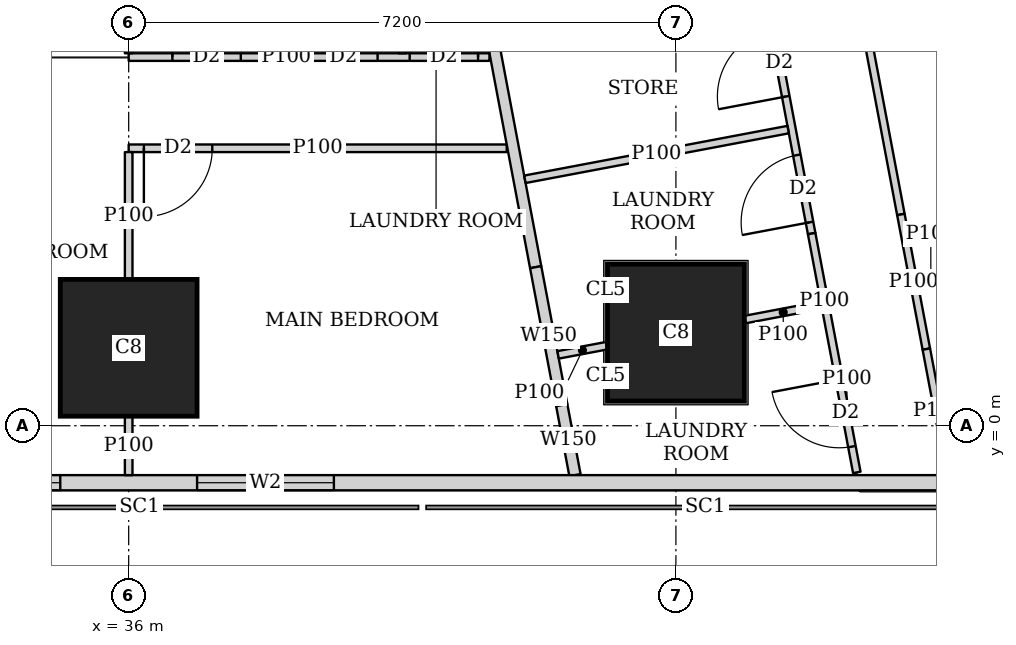
"""IFC4 building model, lengths in metres.
Left out: names, types, materials, properties, quantities, classifications, styles, units other than length and angle.
Written with IfcOpenShell. Run it as: python <this file> out.ifc"""

import sys

from ifc_helpers import new_model, si_unit, direction, frame, frame_2d, origin, origin_2d, place, context, subcontext, project, spatial, rectangle, extrude, element, fill, save


model = new_model("IFC4")
c1 = context("Model", 3, precision=1e-05, world=origin(), true_north=direction((0.0, 1.0)))
c2 = subcontext(c1, "Body", "Model", "MODEL_VIEW")
j1 = project(units=[si_unit("LENGTHUNIT", "METRE"), si_unit("PLANEANGLEUNIT", "RADIAN")], contexts=[c1])
p1 = place(None, origin())
s1 = spatial("IfcSite", under=j1, at=p1, CompositionType="ELEMENT")
p2 = place(p1, origin())
s2 = spatial("IfcBuilding", under=s1, at=p2, CompositionType="ELEMENT")
p3 = place(p2, frame((0.0, 0.0, 139.55)))
s3 = spatial("IfcBuildingStorey", under=s2, at=p3, CompositionType="ELEMENT", Elevation=139.55)
for number, where, z_axis, x_axis in (
    (1, (36.0, 1.025, 0.0), (0.0, 0.0, 1.0), (1.0, 0.0, 0.0)),
    (2, (43.2, 1.225, 0.0), (0.0, 0.0, 1.0), (1.0, 0.0, 0.0)),
):
    element("IfcColumn", number, at=place(p3, frame(where, z_axis=z_axis, x_axis=x_axis)), inside=s3, PredefinedType="COLUMN", context=c2, shape_type="SweptSolid", body=[
        extrude(rectangle(XDim=1.8, YDim=1.8, at=origin_2d()), origin(), (0.0, 0.0, 1.0), 3.75),
    ])
p4 = place(p3, frame((2.163, -0.75, 0.0), z_axis=(0.0, 0.0, 1.0), x_axis=(1.0, 0.0, 0.0)))
e3 = element("IfcWall", 3, at=p4, inside=s3, PredefinedType="SOLIDWALL", context=c2, shape_type="SweptSolid", body=[
    extrude(rectangle(XDim=45.628, YDim=0.2, at=frame_2d((22.814, 0.0))), origin(), (0.0, 0.0, 1.0), 3.5),
])
p5 = place(p4, frame((9.537, 0.0, 0.9)))
e4 = element("IfcOpeningElement", 4, at=p5, cuts=e3, PredefinedType="OPENING", context=c2, shape_type="SweptSolid", body=[
    extrude(rectangle(XDim=1.8, YDim=1.5, at=frame_2d((0.9, 0.75))), frame((0.0, 0.11, 0.0), z_axis=(0.0, -1.0, 0.0), x_axis=(1.0, 0.0, 0.0)), (0.0, 0.0, 1.0), 0.22),
])
p6 = place(p4, frame((13.137, 0.0, 0.9)))
e5 = element("IfcOpeningElement", 5, at=p6, cuts=e3, PredefinedType="OPENING", context=c2, shape_type="SweptSolid", body=[
    extrude(rectangle(XDim=1.8, YDim=1.5, at=frame_2d((0.9, 0.75))), frame((0.0, 0.11, 0.0), z_axis=(0.0, -1.0, 0.0), x_axis=(1.0, 0.0, 0.0)), (0.0, 0.0, 1.0), 0.22),
])
p7 = place(p4, frame((16.737, 0.0, 0.9)))
e6 = element("IfcOpeningElement", 6, at=p7, cuts=e3, PredefinedType="OPENING", context=c2, shape_type="SweptSolid", body=[
    extrude(rectangle(XDim=1.8, YDim=1.5, at=frame_2d((0.9, 0.75))), frame((0.0, 0.11, 0.0), z_axis=(0.0, -1.0, 0.0), x_axis=(1.0, 0.0, 0.0)), (0.0, 0.0, 1.0), 0.22),
])
p8 = place(p4, frame((20.337, 0.0, 0.9)))
e7 = element("IfcOpeningElement", 7, at=p8, cuts=e3, PredefinedType="OPENING", context=c2, shape_type="SweptSolid", body=[
    extrude(rectangle(XDim=1.8, YDim=1.5, at=frame_2d((0.9, 0.75))), frame((0.0, 0.11, 0.0), z_axis=(0.0, -1.0, 0.0), x_axis=(1.0, 0.0, 0.0)), (0.0, 0.0, 1.0), 0.22),
])
p9 = place(p4, frame((23.937, 0.0, 0.9)))
e8 = element("IfcOpeningElement", 8, at=p9, cuts=e3, PredefinedType="OPENING", context=c2, shape_type="SweptSolid", body=[
    extrude(rectangle(XDim=1.8, YDim=1.5, at=frame_2d((0.9, 0.75))), frame((0.0, 0.11, 0.0), z_axis=(0.0, -1.0, 0.0), x_axis=(1.0, 0.0, 0.0)), (0.0, 0.0, 1.0), 0.22),
])
p10 = place(p4, frame((27.537, 0.0, 0.9)))
e9 = element("IfcOpeningElement", 9, at=p10, cuts=e3, PredefinedType="OPENING", context=c2, shape_type="SweptSolid", body=[
    extrude(rectangle(XDim=1.8, YDim=1.5, at=frame_2d((0.9, 0.75))), frame((0.0, 0.11, 0.0), z_axis=(0.0, -1.0, 0.0), x_axis=(1.0, 0.0, 0.0)), (0.0, 0.0, 1.0), 0.22),
])
p11 = place(p4, frame((31.137, 0.0, 0.9)))
e10 = element("IfcOpeningElement", 10, at=p11, cuts=e3, PredefinedType="OPENING", context=c2, shape_type="SweptSolid", body=[
    extrude(rectangle(XDim=1.8, YDim=1.5, at=frame_2d((0.9, 0.75))), frame((0.0, 0.11, 0.0), z_axis=(0.0, -1.0, 0.0), x_axis=(1.0, 0.0, 0.0)), (0.0, 0.0, 1.0), 0.22),
])
p12 = place(p4, frame((34.737, 0.0, 0.9)))
e11 = element("IfcOpeningElement", 11, at=p12, cuts=e3, PredefinedType="OPENING", context=c2, shape_type="SweptSolid", body=[
    extrude(rectangle(XDim=1.8, YDim=1.5, at=frame_2d((0.9, 0.75))), frame((0.0, 0.11, 0.0), z_axis=(0.0, -1.0, 0.0), x_axis=(1.0, 0.0, 0.0)), (0.0, 0.0, 1.0), 0.22),
])
p13 = place(p3, frame((50.653, 2.703, 0.0), z_axis=(0.0, 0.0, 1.0), x_axis=(-0.185612026696, 0.982623109613, 0.0)))
e12 = element("IfcWall", 12, at=p13, inside=s3, PredefinedType="SOLIDWALL", context=c2, shape_type="SweptSolid", body=[
    extrude(rectangle(XDim=41.393, YDim=0.2, at=frame_2d((20.697, 0.0))), origin(), (0.0, 0.0, 1.0), 3.5),
])
p14 = place(p13, frame((1.633, 0.0, 0.9)))
e13 = element("IfcOpeningElement", 13, at=p14, cuts=e12, PredefinedType="OPENING", context=c2, shape_type="SweptSolid", body=[
    extrude(rectangle(XDim=1.8, YDim=1.5, at=frame_2d((0.9, 0.75))), frame((0.0, 0.11, 0.0), z_axis=(0.0, -1.0, 0.0), x_axis=(1.0, 0.0, 0.0)), (0.0, 0.0, 1.0), 0.22),
])
p15 = place(p13, frame((6.032, 0.0, 0.9)))
e14 = element("IfcOpeningElement", 14, at=p15, cuts=e12, PredefinedType="OPENING", context=c2, shape_type="SweptSolid", body=[
    extrude(rectangle(XDim=1.8, YDim=1.5, at=frame_2d((0.9, 0.75))), frame((0.0, 0.11, 0.0), z_axis=(0.0, -1.0, 0.0), x_axis=(1.0, 0.0, 0.0)), (0.0, 0.0, 1.0), 0.22),
])
p16 = place(p13, frame((9.848, 0.0, 0.9)))
e15 = element("IfcOpeningElement", 15, at=p16, cuts=e12, PredefinedType="OPENING", context=c2, shape_type="SweptSolid", body=[
    extrude(rectangle(XDim=1.8, YDim=1.5, at=frame_2d((0.9, 0.75))), frame((0.0, 0.11, 0.0), z_axis=(0.0, -1.0, 0.0), x_axis=(1.0, 0.0, 0.0)), (0.0, 0.0, 1.0), 0.22),
])
p17 = place(p13, frame((13.664, 0.0, 0.9)))
e16 = element("IfcOpeningElement", 16, at=p17, cuts=e12, PredefinedType="OPENING", context=c2, shape_type="SweptSolid", body=[
    extrude(rectangle(XDim=1.8, YDim=1.5, at=frame_2d((0.9, 0.75))), frame((0.0, 0.11, 0.0), z_axis=(0.0, -1.0, 0.0), x_axis=(1.0, 0.0, 0.0)), (0.0, 0.0, 1.0), 0.22),
])
p18 = place(p13, frame((17.481, 0.0, 0.9)))
e17 = element("IfcOpeningElement", 17, at=p18, cuts=e12, PredefinedType="OPENING", context=c2, shape_type="SweptSolid", body=[
    extrude(rectangle(XDim=1.8, YDim=1.5, at=frame_2d((0.9, 0.75))), frame((0.0, 0.11, 0.0), z_axis=(0.0, -1.0, 0.0), x_axis=(1.0, 0.0, 0.0)), (0.0, 0.0, 1.0), 0.22),
])
p19 = place(p13, frame((21.297, 0.0, 0.9)))
e18 = element("IfcOpeningElement", 18, at=p19, cuts=e12, PredefinedType="OPENING", context=c2, shape_type="SweptSolid", body=[
    extrude(rectangle(XDim=1.8, YDim=1.5, at=frame_2d((0.9, 0.75))), frame((0.0, 0.11, 0.0), z_axis=(0.0, -1.0, 0.0), x_axis=(1.0, 0.0, 0.0)), (0.0, 0.0, 1.0), 0.22),
])
p20 = place(p13, frame((25.113, 0.0, 0.9)))
e19 = element("IfcOpeningElement", 19, at=p20, cuts=e12, PredefinedType="OPENING", context=c2, shape_type="SweptSolid", body=[
    extrude(rectangle(XDim=1.8, YDim=1.5, at=frame_2d((0.9, 0.75))), frame((0.0, 0.11, 0.0), z_axis=(0.0, -1.0, 0.0), x_axis=(1.0, 0.0, 0.0)), (0.0, 0.0, 1.0), 0.22),
])
p21 = place(p13, frame((28.93, 0.0, 0.9)))
e20 = element("IfcOpeningElement", 20, at=p21, cuts=e12, PredefinedType="OPENING", context=c2, shape_type="SweptSolid", body=[
    extrude(rectangle(XDim=1.8, YDim=1.5, at=frame_2d((0.9, 0.75))), frame((0.0, 0.11, 0.0), z_axis=(0.0, -1.0, 0.0), x_axis=(1.0, 0.0, 0.0)), (0.0, 0.0, 1.0), 0.22),
])
p22 = place(p13, frame((32.746, 0.0, 0.9)))
e21 = element("IfcOpeningElement", 21, at=p22, cuts=e12, PredefinedType="OPENING", context=c2, shape_type="SweptSolid", body=[
    extrude(rectangle(XDim=1.8, YDim=1.5, at=frame_2d((0.9, 0.75))), frame((0.0, 0.11, 0.0), z_axis=(0.0, -1.0, 0.0), x_axis=(1.0, 0.0, 0.0)), (0.0, 0.0, 1.0), 0.22),
])
p23 = place(p13, frame((36.481, 0.0, 0.9)))
e22 = element("IfcOpeningElement", 22, at=p23, cuts=e12, PredefinedType="OPENING", context=c2, shape_type="SweptSolid", body=[
    extrude(rectangle(XDim=1.8, YDim=1.5, at=frame_2d((0.9, 0.75))), frame((0.0, 0.11, 0.0), z_axis=(0.0, -1.0, 0.0), x_axis=(1.0, 0.0, 0.0)), (0.0, 0.0, 1.0), 0.22),
])
p24 = place(p3, frame((33.623, 43.022, 0.0), z_axis=(0.0, 0.0, 1.0), x_axis=(0.185596841028, -0.98262597798, 0.0)))
e23 = element("IfcWall", 23, at=p24, inside=s3, PredefinedType="SOLIDWALL", context=c2, shape_type="SweptSolid", body=[
    extrude(rectangle(XDim=41.66, YDim=0.15, at=frame_2d((20.83, 0.0))), origin(), (0.0, 0.0, 1.0), 2.5),
])
p25 = place(p24, frame((20.242, 0.0, 0.0)))
e24 = element("IfcOpeningElement", 24, at=p25, cuts=e23, PredefinedType="OPENING", context=c2, shape_type="SweptSolid", body=[
    extrude(rectangle(XDim=1.0, YDim=2.1, at=frame_2d((0.5, 1.05))), frame((0.0, 0.085, 0.0), z_axis=(0.0, -1.0, 0.0), x_axis=(1.0, 0.0, 0.0)), (0.0, 0.0, 1.0), 0.17),
])
p26 = place(p24, frame((24.714, 0.0, 0.0)))
e25 = element("IfcOpeningElement", 25, at=p26, cuts=e23, PredefinedType="OPENING", context=c2, shape_type="SweptSolid", body=[
    extrude(rectangle(XDim=1.0, YDim=2.1, at=frame_2d((0.5, 1.05))), frame((0.0, 0.085, 0.0), z_axis=(0.0, -1.0, 0.0), x_axis=(1.0, 0.0, 0.0)), (0.0, 0.0, 1.0), 0.17),
])
p27 = place(p24, frame((31.206, 0.0, 0.0)))
e26 = element("IfcOpeningElement", 26, at=p27, cuts=e23, PredefinedType="OPENING", context=c2, shape_type="SweptSolid", body=[
    extrude(rectangle(XDim=1.0, YDim=2.1, at=frame_2d((0.5, 1.05))), frame((0.0, 0.085, 0.0), z_axis=(0.0, -1.0, 0.0), x_axis=(1.0, 0.0, 0.0)), (0.0, 0.0, 1.0), 0.17),
])
p28 = place(p3, frame((41.355, 2.086, 0.0), z_axis=(0.0, 0.0, 1.0), x_axis=(0.185708872674, -0.982604811005, 0.0)))
e27 = element("IfcWall", 27, at=p28, inside=s3, PredefinedType="SOLIDWALL", context=c2, shape_type="SweptSolid", body=[
    extrude(rectangle(XDim=1.847, YDim=0.15, at=frame_2d((0.924, 0.0))), origin(), (0.0, 0.0, 1.0), 2.1),
])
p29 = place(p3, frame((41.698, 0.271, 0.0), z_axis=(0.0, 0.0, 1.0), x_axis=(0.185735329995, -0.982599810295, 0.0)))
e28 = element("IfcWall", 28, at=p29, inside=s3, PredefinedType="SOLIDWALL", context=c2, shape_type="SweptSolid", body=[
    extrude(rectangle(XDim=0.937, YDim=0.15, at=frame_2d((0.469, 0.0))), origin(), (0.0, 0.0, 1.0), 3.5),
])
p30 = place(p3, frame((40.974, 3.65, 0.0), z_axis=(0.0, 0.0, 1.0), x_axis=(-1.0, 0.0, 0.0)))
e29 = element("IfcWall", 29, at=p30, inside=s3, PredefinedType="PARTITIONING", context=c2, shape_type="SweptSolid", body=[
    extrude(rectangle(XDim=4.974, YDim=0.1, at=frame_2d((2.487, 0.0))), origin(), (0.0, 0.0, 1.0), 3.5),
])
p31 = place(p30, frame((3.874, 0.0, 0.0)))
e30 = element("IfcOpeningElement", 30, at=p31, cuts=e29, PredefinedType="OPENING", context=c2, shape_type="SweptSolid", body=[
    extrude(rectangle(XDim=0.9, YDim=2.1, at=frame_2d((0.45, 1.05))), frame((0.0, 0.06, 0.0), z_axis=(0.0, -1.0, 0.0), x_axis=(1.0, 0.0, 0.0)), (0.0, 0.0, 1.0), 0.12),
])
p32 = place(p3, frame((40.747, 4.85, 0.0), z_axis=(0.0, 0.0, 1.0), x_axis=(-1.0, 0.0, 0.0)))
e31 = element("IfcWall", 31, at=p32, inside=s3, PredefinedType="PARTITIONING", context=c2, shape_type="SweptSolid", body=[
    extrude(rectangle(XDim=4.747, YDim=0.1, at=frame_2d((2.374, 0.0))), origin(), (0.0, 0.0, 1.0), 3.5),
])
p33 = place(p32, frame((3.272, 0.0, 0.0)))
e32 = element("IfcOpeningElement", 32, at=p33, cuts=e31, PredefinedType="OPENING", context=c2, shape_type="SweptSolid", body=[
    extrude(rectangle(XDim=0.9, YDim=2.1, at=frame_2d((0.45, 1.05))), frame((0.0, 0.06, 0.0), z_axis=(0.0, -1.0, 0.0), x_axis=(1.0, 0.0, 0.0)), (0.0, 0.0, 1.0), 0.12),
])
p34 = place(p32, frame((0.15, 0.0, 0.0)))
e33 = element("IfcOpeningElement", 33, at=p34, cuts=e31, PredefinedType="OPENING", context=c2, shape_type="SweptSolid", body=[
    extrude(rectangle(XDim=0.9, YDim=2.1, at=frame_2d((0.45, 1.05))), frame((0.0, 0.06, 0.0), z_axis=(0.0, -1.0, 0.0), x_axis=(1.0, 0.0, 0.0)), (0.0, 0.0, 1.0), 0.12),
])
p35 = place(p32, frame((1.472, 0.0, 0.0)))
e34 = element("IfcOpeningElement", 34, at=p35, cuts=e31, PredefinedType="OPENING", context=c2, shape_type="SweptSolid", body=[
    extrude(rectangle(XDim=0.9, YDim=2.1, at=frame_2d((0.45, 1.05))), frame((0.0, 0.06, 0.0), z_axis=(0.0, -1.0, 0.0), x_axis=(1.0, 0.0, 0.0)), (0.0, 0.0, 1.0), 0.12),
])
p36 = place(p3, frame((36.0, -0.65, 0.0), z_axis=(0.0, 0.0, 1.0), x_axis=(0.0, 1.0, 0.0)))
e35 = element("IfcWall", 35, at=p36, inside=s3, PredefinedType="PARTITIONING", context=c2, shape_type="SweptSolid", body=[
    extrude(rectangle(XDim=0.774, YDim=0.1, at=frame_2d((0.387, 0.0))), origin(), (0.0, 0.0, 1.0), 3.5),
])
p37 = place(p3, frame((36.0, 1.926, 0.0), z_axis=(0.0, 0.0, 1.0), x_axis=(0.0, 1.0, 0.0)))
e36 = element("IfcWall", 36, at=p37, inside=s3, PredefinedType="PARTITIONING", context=c2, shape_type="SweptSolid", body=[
    extrude(rectangle(XDim=1.674, YDim=0.1, at=frame_2d((0.837, 0.0))), origin(), (0.0, 0.0, 1.0), 3.5),
])
p38 = place(p3, frame((36.0, 4.9, 0.0), z_axis=(0.0, 0.0, 1.0), x_axis=(0.0, 1.0, 0.0)))
e37 = element("IfcWall", 37, at=p38, inside=s3, PredefinedType="PARTITIONING", context=c2, shape_type="SweptSolid", body=[
    extrude(rectangle(XDim=1.849, YDim=0.1, at=frame_2d((0.925, 0.0))), origin(), (0.0, 0.0, 1.0), 3.5),
])
for number, where, z_axis, x_axis in (
    (38, (39.6, 4.9, 0.0), (0.0, 0.0, 1.0), (0.0, 1.0, 0.0)),
    (39, (38.05, 4.9, 0.0), (0.0, 0.0, 1.0), (0.0, 1.0, 0.0)),
):
    element("IfcWall", number, at=place(p3, frame(where, z_axis=z_axis, x_axis=x_axis)), inside=s3, PredefinedType="PARTITIONING", context=c2, shape_type="SweptSolid", body=[
        extrude(rectangle(XDim=3.525, YDim=0.1, at=frame_2d((1.763, 0.0))), origin(), (0.0, 0.0, 1.0), 3.5),
    ])
p39 = place(p3, frame((44.727, 10.366, 0.0), z_axis=(0.0, 0.0, 1.0), x_axis=(0.185578957652, -0.982629355595, 0.0)))
e40 = element("IfcWall", 40, at=p39, inside=s3, PredefinedType="PARTITIONING", context=c2, shape_type="SweptSolid", body=[
    extrude(rectangle(XDim=7.721, YDim=0.1, at=frame_2d((3.86, 0.0))), origin(), (0.0, 0.0, 1.0), 3.5),
])
p40 = place(p39, frame((0.151, 0.0, 0.0)))
e41 = element("IfcOpeningElement", 41, at=p40, cuts=e40, PredefinedType="OPENING", context=c2, shape_type="SweptSolid", body=[
    extrude(rectangle(XDim=0.9, YDim=2.1, at=frame_2d((0.45, 1.05))), frame((0.0, 0.06, 0.0), z_axis=(0.0, -1.0, 0.0), x_axis=(1.0, 0.0, 0.0)), (0.0, 0.0, 1.0), 0.12),
])
p41 = place(p39, frame((3.806, 0.0, 0.0)))
e42 = element("IfcOpeningElement", 42, at=p41, cuts=e40, PredefinedType="OPENING", context=c2, shape_type="SweptSolid", body=[
    extrude(rectangle(XDim=0.9, YDim=2.1, at=frame_2d((0.45, 1.05))), frame((0.0, 0.06, 0.0), z_axis=(0.0, -1.0, 0.0), x_axis=(1.0, 0.0, 0.0)), (0.0, 0.0, 1.0), 0.12),
])
p42 = place(p3, frame((46.16, 2.779, 0.0), z_axis=(0.0, 0.0, 1.0), x_axis=(0.18597295662, -0.982554863306, 0.0)))
e43 = element("IfcWall", 43, at=p42, inside=s3, PredefinedType="PARTITIONING", context=c2, shape_type="SweptSolid", body=[
    extrude(rectangle(XDim=1.802, YDim=0.1, at=frame_2d((0.901, 0.0))), origin(), (0.0, 0.0, 1.0), 2.1),
])
p43 = place(p3, frame((46.495, 1.008, 0.0), z_axis=(0.0, 0.0, 1.0), x_axis=(0.185535059532, -0.982637645159, 0.0)))
e44 = element("IfcWall", 44, at=p43, inside=s3, PredefinedType="PARTITIONING", context=c2, shape_type="SweptSolid", body=[
    extrude(rectangle(XDim=1.644, YDim=0.1, at=frame_2d((0.822, 0.0))), origin(), (0.0, 0.0, 1.0), 3.5),
])
p44 = place(p3, frame((43.999, 7.755, 0.0), z_axis=(0.0, 0.0, 1.0), x_axis=(0.185565904578, -0.982631820703, 0.0)))
e45 = element("IfcWall", 45, at=p44, inside=s3, PredefinedType="PARTITIONING", context=c2, shape_type="SweptSolid", body=[
    extrude(rectangle(XDim=5.319, YDim=0.1, at=frame_2d((2.66, 0.0))), origin(), (0.0, 0.0, 1.0), 3.5),
])
p45 = place(p44, frame((1.0, 0.0, 0.0)))
e46 = element("IfcOpeningElement", 46, at=p45, cuts=e45, PredefinedType="OPENING", context=c2, shape_type="SweptSolid", body=[
    extrude(rectangle(XDim=0.9, YDim=2.1, at=frame_2d((0.45, 1.05))), frame((0.0, 0.06, 0.0), z_axis=(0.0, -1.0, 0.0), x_axis=(1.0, 0.0, 0.0)), (0.0, 0.0, 1.0), 0.12),
])
p46 = place(p44, frame((4.269, 0.0, 0.0)))
e47 = element("IfcOpeningElement", 47, at=p46, cuts=e45, PredefinedType="OPENING", context=c2, shape_type="SweptSolid", body=[
    extrude(rectangle(XDim=0.9, YDim=2.1, at=frame_2d((0.45, 1.05))), frame((0.0, 0.06, 0.0), z_axis=(0.0, -1.0, 0.0), x_axis=(1.0, 0.0, 0.0)), (0.0, 0.0, 1.0), 0.12),
])
p47 = place(p44, frame((2.585, 0.0, 0.0)))
e48 = element("IfcOpeningElement", 48, at=p47, cuts=e45, PredefinedType="OPENING", context=c2, shape_type="SweptSolid", body=[
    extrude(rectangle(XDim=0.9, YDim=2.1, at=frame_2d((0.45, 1.05))), frame((0.0, 0.06, 0.0), z_axis=(0.0, -1.0, 0.0), x_axis=(1.0, 0.0, 0.0)), (0.0, 0.0, 1.0), 0.12),
])
p48 = place(p3, frame((44.986, 2.528, 0.0), z_axis=(0.0, 0.0, 1.0), x_axis=(0.18584218627, -0.982579605835, 0.0)))
e49 = element("IfcWall", 49, at=p48, inside=s3, PredefinedType="PARTITIONING", context=c2, shape_type="SweptSolid", body=[
    extrude(rectangle(XDim=1.802, YDim=0.1, at=frame_2d((0.901, 0.0))), origin(), (0.0, 0.0, 1.0), 2.1),
])
p49 = place(p3, frame((45.321, 0.757, 0.0), z_axis=(0.0, 0.0, 1.0), x_axis=(0.185640562635, -0.982617718904, 0.0)))
e50 = element("IfcWall", 50, at=p49, inside=s3, PredefinedType="PARTITIONING", context=c2, shape_type="SweptSolid", body=[
    extrude(rectangle(XDim=1.395, YDim=0.1, at=frame_2d((0.698, 0.0))), origin(), (0.0, 0.0, 1.0), 3.5),
])
p50 = place(p49, frame((0.15, 0.0, 0.0)))
e51 = element("IfcOpeningElement", 51, at=p50, cuts=e50, PredefinedType="OPENING", context=c2, shape_type="SweptSolid", body=[
    extrude(rectangle(XDim=0.9, YDim=2.1, at=frame_2d((0.45, 1.05))), frame((0.0, 0.06, 0.0), z_axis=(0.0, -1.0, 0.0), x_axis=(1.0, 0.0, 0.0)), (0.0, 0.0, 1.0), 0.12),
])
p51 = place(p3, frame((46.738, 2.006, 0.0), z_axis=(0.0, 0.0, 1.0), x_axis=(-0.982820466874, -0.184564161994, 0.0)))
e52 = element("IfcWall", 52, at=p51, inside=s3, PredefinedType="PARTITIONING", context=c2, shape_type="SweptSolid", body=[
    extrude(rectangle(XDim=0.374, YDim=0.1, at=frame_2d((0.187, 0.0))), origin(), (0.0, 0.0, 1.0), 2.1),
])
p52 = place(p3, frame((45.114, 1.587, 0.0), z_axis=(0.0, 0.0, 1.0), x_axis=(-0.982567886437, -0.185904138047, 0.0)))
e53 = element("IfcWall", 53, at=p52, inside=s3, PredefinedType="PARTITIONING", context=c2, shape_type="SweptSolid", body=[
    extrude(rectangle(XDim=1.022, YDim=0.1, at=frame_2d((0.511, 0.0))), origin(), (0.0, 0.0, 1.0), 2.1),
])
p53 = place(p3, frame((42.29, 1.053, 0.0), z_axis=(0.0, 0.0, 1.0), x_axis=(-0.982573945355, -0.185872111707, 0.0)))
e54 = element("IfcWall", 54, at=p53, inside=s3, PredefinedType="PARTITIONING", context=c2, shape_type="SweptSolid", body=[
    extrude(rectangle(XDim=0.652, YDim=0.1, at=frame_2d((0.326, 0.0))), origin(), (0.0, 0.0, 1.0), 2.1),
])
p54 = place(p3, frame((44.677, 3.896, 0.0), z_axis=(0.0, 0.0, 1.0), x_axis=(-0.982638553676, -0.185530247748, 0.0)))
e55 = element("IfcWall", 55, at=p54, inside=s3, PredefinedType="PARTITIONING", context=c2, shape_type="SweptSolid", body=[
    extrude(rectangle(XDim=3.525, YDim=0.1, at=frame_2d((1.763, 0.0))), origin(), (0.0, 0.0, 1.0), 3.5),
])
p55 = place(p11, origin())
e56 = element("IfcWindow", 56, at=p55, inside=s3, PartitioningType="SINGLE_PANEL", PredefinedType="WINDOW", context=c2, shape_type="SweptSolid", body=[
    extrude(rectangle(XDim=1.8, YDim=1.5, at=frame_2d((0.9, 0.75))), frame((0.0, 0.03, 0.0), z_axis=(0.0, -1.0, 0.0), x_axis=(1.0, 0.0, 0.0)), (0.0, 0.0, 1.0), 0.06),
])
fill(e10, e56)
p56 = place(p12, origin())
e57 = element("IfcWindow", 57, at=p56, inside=s3, PartitioningType="SINGLE_PANEL", PredefinedType="WINDOW", context=c2, shape_type="SweptSolid", body=[
    extrude(rectangle(XDim=1.8, YDim=1.5, at=frame_2d((0.9, 0.75))), frame((0.0, 0.03, 0.0), z_axis=(0.0, -1.0, 0.0), x_axis=(1.0, 0.0, 0.0)), (0.0, 0.0, 1.0), 0.06),
])
fill(e11, e57)
p57 = place(p31, origin())
e58 = element("IfcDoor", 58, at=p57, inside=s3, OperationType="SINGLE_SWING_RIGHT", PredefinedType="DOOR", context=c2, shape_type="SweptSolid", body=[
    extrude(rectangle(XDim=0.9, YDim=2.1, at=frame_2d((0.45, 1.05))), frame((0.0, 0.025, 0.0), z_axis=(0.0, -1.0, 0.0), x_axis=(1.0, 0.0, 0.0)), (0.0, 0.0, 1.0), 0.05),
])
fill(e30, e58)
p58 = place(p33, origin())
e59 = element("IfcDoor", 59, at=p58, inside=s3, OperationType="SINGLE_SWING_LEFT", PredefinedType="DOOR", context=c2, shape_type="SweptSolid", body=[
    extrude(rectangle(XDim=0.9, YDim=2.1, at=frame_2d((0.45, 1.05))), frame((0.0, 0.025, 0.0), z_axis=(0.0, -1.0, 0.0), x_axis=(1.0, 0.0, 0.0)), (0.0, 0.0, 1.0), 0.05),
])
fill(e32, e59)
p59 = place(p34, origin())
e60 = element("IfcDoor", 60, at=p59, inside=s3, OperationType="SINGLE_SWING_RIGHT", PredefinedType="DOOR", context=c2, shape_type="SweptSolid", body=[
    extrude(rectangle(XDim=0.9, YDim=2.1, at=frame_2d((0.45, 1.05))), frame((0.0, 0.025, 0.0), z_axis=(0.0, -1.0, 0.0), x_axis=(1.0, 0.0, 0.0)), (0.0, 0.0, 1.0), 0.05),
])
fill(e33, e60)
p60 = place(p35, origin())
e61 = element("IfcDoor", 61, at=p60, inside=s3, OperationType="SINGLE_SWING_LEFT", PredefinedType="DOOR", context=c2, shape_type="SweptSolid", body=[
    extrude(rectangle(XDim=0.9, YDim=2.1, at=frame_2d((0.45, 1.05))), frame((0.0, 0.025, 0.0), z_axis=(0.0, -1.0, 0.0), x_axis=(1.0, 0.0, 0.0)), (0.0, 0.0, 1.0), 0.05),
])
fill(e34, e61)
p61 = place(p46, origin())
e62 = element("IfcDoor", 62, at=p61, inside=s3, OperationType="SINGLE_SWING_LEFT", PredefinedType="DOOR", context=c2, shape_type="SweptSolid", body=[
    extrude(rectangle(XDim=0.9, YDim=2.1, at=frame_2d((0.45, 1.05))), frame((0.0, 0.025, 0.0), z_axis=(0.0, -1.0, 0.0), x_axis=(1.0, 0.0, 0.0)), (0.0, 0.0, 1.0), 0.05),
])
fill(e47, e62)
p62 = place(p50, origin())
e63 = element("IfcDoor", 63, at=p62, inside=s3, OperationType="SINGLE_SWING_RIGHT", PredefinedType="DOOR", context=c2, shape_type="SweptSolid", body=[
    extrude(rectangle(XDim=0.9, YDim=2.1, at=frame_2d((0.45, 1.05))), frame((0.0, 0.025, 0.0), z_axis=(0.0, -1.0, 0.0), x_axis=(1.0, 0.0, 0.0)), (0.0, 0.0, 1.0), 0.05),
])
fill(e51, e63)
p63 = place(p47, origin())
e64 = element("IfcDoor", 64, at=p63, inside=s3, OperationType="SINGLE_SWING_LEFT", PredefinedType="DOOR", context=c2, shape_type="SweptSolid", body=[
    extrude(rectangle(XDim=0.9, YDim=2.1, at=frame_2d((0.45, 1.05))), frame((0.0, 0.025, 0.0), z_axis=(0.0, -1.0, 0.0), x_axis=(1.0, 0.0, 0.0)), (0.0, 0.0, 1.0), 0.05),
])
fill(e48, e64)
save(model, sys.argv[1])
